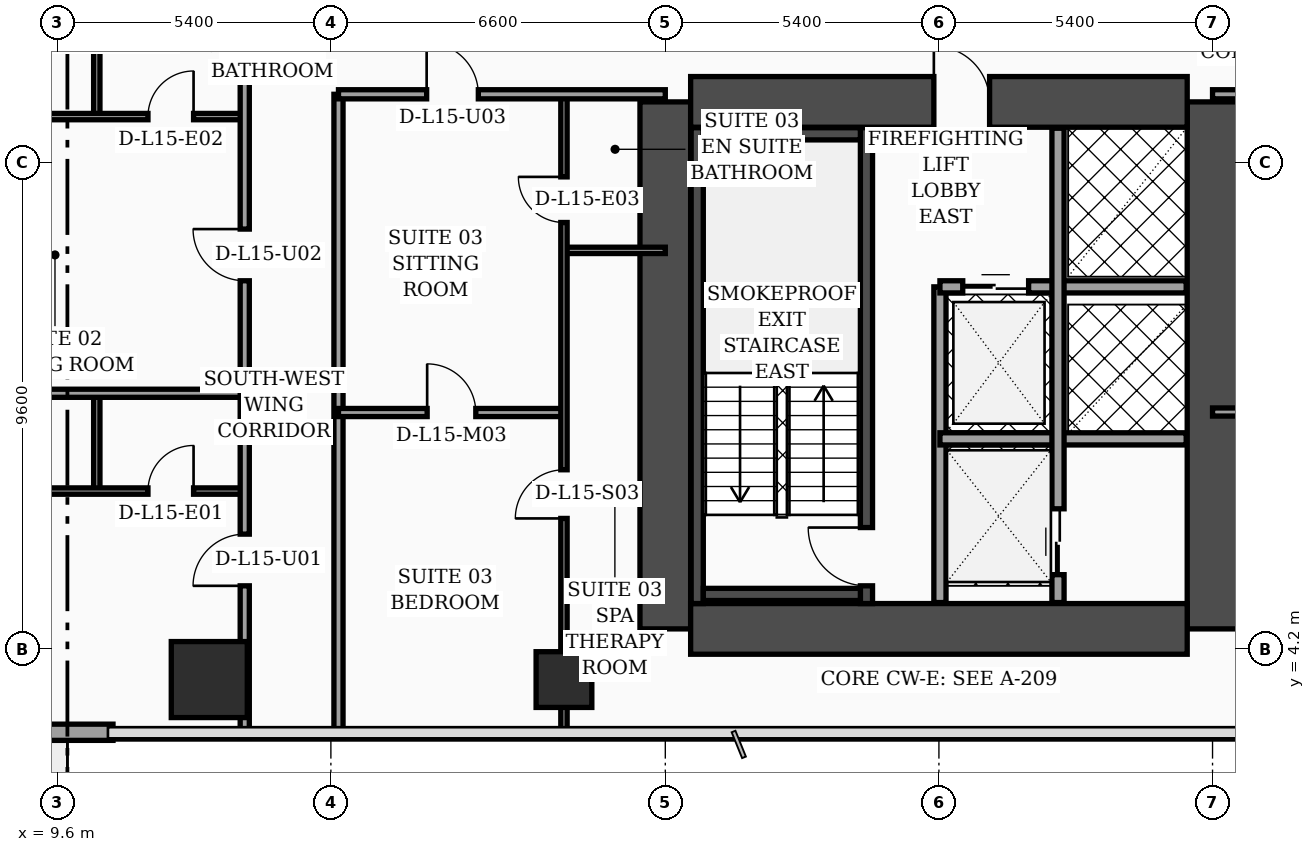
"""IFC4 building model, lengths in metres.
Left out: names, types, materials, properties, quantities, classifications, styles, units other than length and angle.
Written with IfcOpenShell. Run it as: python <this file> out.ifc"""

import sys

from ifc_helpers import new_model, si_unit, direction, frame, frame_2d, origin, origin_2d, place, context, subcontext, project, spatial, rectangle, hollow_rectangle, extrude, element, fill, save


model = new_model("IFC4")
c1 = context("Model", 3, precision=1e-05, world=origin(), true_north=direction((0.0, 1.0)))
c2 = subcontext(c1, "Body", "Model", "MODEL_VIEW")
j1 = project(units=[si_unit("LENGTHUNIT", "METRE"), si_unit("PLANEANGLEUNIT", "RADIAN")], contexts=[c1])
p1 = place(None, origin())
s1 = spatial("IfcSite", under=j1, at=p1, CompositionType="ELEMENT")
p2 = place(p1, origin())
s2 = spatial("IfcBuilding", under=s1, at=p2, CompositionType="ELEMENT")
p3 = place(p2, frame((0.0, 0.0, 66.0)))
s3 = spatial("IfcBuildingStorey", under=s2, at=p3, CompositionType="ELEMENT", Elevation=66.0)
for number, where, z_axis, x_axis in (
    (1, (21.6, 4.6, 0.0), (0.0, 0.0, 1.0), (0.0, 1.0, 0.0)),
    (2, (32.4, 4.6, 0.0), (0.0, 0.0, 1.0), (0.0, 1.0, 0.0)),
):
    element("IfcWall", number, at=place(p3, frame(where, z_axis=z_axis, x_axis=x_axis)), inside=s3, PredefinedType="SHEAR", context=c2, shape_type="SweptSolid", body=[
        extrude(rectangle(XDim=10.4, YDim=1.0, at=frame_2d((5.2, 0.0))), origin(), (0.0, 0.0, 1.0), 3.56),
    ])
p4 = place(p3, frame((22.1, 15.0, 0.0), z_axis=(0.0, 0.0, 1.0), x_axis=(1.0, 0.0, 0.0)))
e3 = element("IfcWall", 3, at=p4, inside=s3, PredefinedType="SHEAR", context=c2, shape_type="SweptSolid", body=[
    extrude(rectangle(XDim=9.8, YDim=1.0, at=frame_2d((4.9, 0.0))), origin(), (0.0, 0.0, 1.0), 3.56),
])
p5 = place(p4, frame((4.8, 0.0, 0.0)))
e4 = element("IfcOpeningElement", 4, at=p5, cuts=e3, PredefinedType="OPENING", context=c2, shape_type="SweptSolid", body=[
    extrude(rectangle(XDim=1.1, YDim=2.2, at=frame_2d((0.55, 1.1))), frame((0.0, 0.51, 0.0), z_axis=(0.0, -1.0, 0.0), x_axis=(1.0, 0.0, 0.0)), (0.0, 0.0, 1.0), 1.02),
])
p6 = place(p3, frame((22.1, 4.6, 0.0), z_axis=(0.0, 0.0, 1.0), x_axis=(1.0, 0.0, 0.0)))
e5 = element("IfcWall", 5, at=p6, inside=s3, PredefinedType="SHEAR", context=c2, shape_type="SweptSolid", body=[
    extrude(rectangle(XDim=9.8, YDim=1.0, at=frame_2d((4.9, 0.0))), origin(), (0.0, 0.0, 1.0), 3.56),
])
p7 = place(p3, frame((22.23, 5.1, 0.0), z_axis=(0.0, 0.0, 1.0), x_axis=(0.0, 1.0, 0.0)))
e6 = element("IfcWall", 6, at=p7, inside=s3, PredefinedType="SOLIDWALL", context=c2, shape_type="SweptSolid", body=[
    extrude(rectangle(XDim=9.39, YDim=0.24, at=frame_2d((4.695, 0.0))), origin(), (0.0, 0.0, 1.0), 3.56),
])
p8 = place(p3, frame((25.57, 5.1, 0.0), z_axis=(0.0, 0.0, 1.0), x_axis=(0.0, 1.0, 0.0)))
e7 = element("IfcWall", 7, at=p8, inside=s3, PredefinedType="SOLIDWALL", context=c2, shape_type="SweptSolid", body=[
    extrude(rectangle(XDim=9.39, YDim=0.24, at=frame_2d((4.695, 0.0))), origin(), (0.0, 0.0, 1.0), 3.56),
])
p9 = place(p8, frame((0.35, 0.0, 0.0)))
e8 = element("IfcOpeningElement", 8, at=p9, cuts=e7, PredefinedType="OPENING", context=c2, shape_type="SweptSolid", body=[
    extrude(rectangle(XDim=1.15, YDim=2.2, at=frame_2d((0.575, 1.1))), frame((0.0, 0.13, 0.0), z_axis=(0.0, -1.0, 0.0), x_axis=(1.0, 0.0, 0.0)), (0.0, 0.0, 1.0), 0.26),
])
for number, where, z_axis, x_axis in (
    (9, (22.35, 5.28, 0.0), (0.0, 0.0, 1.0), (1.0, 0.0, 0.0)),
    (10, (22.35, 14.37, 0.0), (0.0, 0.0, 1.0), (1.0, 0.0, 0.0)),
):
    element("IfcWall", number, at=place(p3, frame(where, z_axis=z_axis, x_axis=x_axis)), inside=s3, PredefinedType="SOLIDWALL", context=c2, shape_type="SweptSolid", body=[
        extrude(rectangle(XDim=3.1, YDim=0.24, at=frame_2d((1.55, 0.0))), origin(), (0.0, 0.0, 1.0), 3.56),
    ])
p10 = place(p3, frame((12.6, 3.6, 0.0), z_axis=(0.0, 0.0, 1.0), x_axis=(1.0, 0.0, 0.0)))
e11 = element("IfcColumn", 11, at=p10, inside=s3, PredefinedType="COLUMN", context=c2, shape_type="SweptSolid", body=[
    extrude(rectangle(XDim=1.5, YDim=1.5, at=origin_2d()), origin(), (0.0, 0.0, 1.0), 3.56),
])
p11 = place(p3, frame((19.6, 3.6, 0.0), z_axis=(0.0, 0.0, 1.0), x_axis=(1.0, 0.0, 0.0)))
e12 = element("IfcColumn", 12, at=p11, inside=s3, PredefinedType="COLUMN", context=c2, shape_type="SweptSolid", body=[
    extrude(hollow_rectangle(XDim=1.1, YDim=1.1, WallThickness=0.045, at=origin_2d()), origin(), (0.0, 0.0, 1.0), 3.56),
])
p12 = place(p3, frame((3.1, 2.56, 0.0), z_axis=(0.0, 0.0, 1.0), x_axis=(1.0, 0.0, 0.0)))
e13 = element("IfcWall", 13, at=p12, inside=s3, PredefinedType="SOLIDWALL", context=c2, shape_type="SweptSolid", body=[
    extrude(rectangle(XDim=7.6, YDim=0.32, at=frame_2d((3.8, 0.0))), origin(), (0.0, 0.0, 1.0), 3.56),
])
p13 = place(p12, frame((0.45, 0.0, 0.75)))
e14 = element("IfcOpeningElement", 14, at=p13, cuts=e13, PredefinedType="OPENING", context=c2, shape_type="SweptSolid", body=[
    extrude(rectangle(XDim=1.0, YDim=1.6, at=frame_2d((0.5, 0.8))), frame((0.0, 0.17, 0.0), z_axis=(0.0, -1.0, 0.0), x_axis=(1.0, 0.0, 0.0)), (0.0, 0.0, 1.0), 0.34),
])
p14 = place(p12, frame((3.8, 0.0, 0.0)))
e15 = element("IfcOpeningElement", 15, at=p14, cuts=e13, PredefinedType="OPENING", context=c2, shape_type="SweptSolid", body=[
    extrude(rectangle(XDim=1.4, YDim=2.25, at=frame_2d((0.7, 1.125))), frame((0.0, 0.17, 0.0), z_axis=(0.0, -1.0, 0.0), x_axis=(1.0, 0.0, 0.0)), (0.0, 0.0, 1.0), 0.34),
])
p15 = place(p3, frame((27.02, 5.12, 0.0), z_axis=(0.0, 0.0, 1.0), x_axis=(0.0, 1.0, 0.0)))
e16 = element("IfcWall", 16, at=p15, inside=s3, PredefinedType="SOLIDWALL", context=c2, shape_type="SweptSolid", body=[
    extrude(rectangle(XDim=6.23, YDim=0.24, at=frame_2d((3.115, 0.0))), origin(), (0.0, 0.0, 1.0), 3.56),
])
p16 = place(p3, frame((27.02, 11.35, 0.0), z_axis=(0.0, 0.0, 1.0), x_axis=(1.0, 0.0, 0.0)))
e17 = element("IfcWall", 17, at=p16, inside=s3, PredefinedType="SOLIDWALL", context=c2, shape_type="SweptSolid", body=[
    extrude(rectangle(XDim=4.86, YDim=0.24, at=frame_2d((2.43, 0.0))), origin(), (0.0, 0.0, 1.0), 3.56),
])
p17 = place(p16, frame((0.45, 0.0, 0.0)))
e18 = element("IfcOpeningElement", 18, at=p17, cuts=e17, PredefinedType="OPENING", context=c2, shape_type="SweptSolid", body=[
    extrude(rectangle(XDim=1.3, YDim=2.35, at=frame_2d((0.65, 1.175))), frame((0.0, 0.13, 0.0), z_axis=(0.0, -1.0, 0.0), x_axis=(1.0, 0.0, 0.0)), (0.0, 0.0, 1.0), 0.26),
])
p18 = place(p3, frame((27.02, 8.35, 0.0), z_axis=(0.0, 0.0, 1.0), x_axis=(1.0, 0.0, 0.0)))
e19 = element("IfcWall", 19, at=p18, inside=s3, PredefinedType="SOLIDWALL", context=c2, shape_type="SweptSolid", body=[
    extrude(rectangle(XDim=4.86, YDim=0.24, at=frame_2d((2.43, 0.0))), origin(), (0.0, 0.0, 1.0), 3.56),
])
p19 = place(p3, frame((29.35, 5.12, 0.0), z_axis=(0.0, 0.0, 1.0), x_axis=(0.0, 1.0, 0.0)))
e20 = element("IfcWall", 20, at=p19, inside=s3, PredefinedType="SOLIDWALL", context=c2, shape_type="SweptSolid", body=[
    extrude(rectangle(XDim=9.36, YDim=0.24, at=frame_2d((4.68, 0.0))), origin(), (0.0, 0.0, 1.0), 3.56),
])
p20 = place(p19, frame((0.55, 0.0, 0.0)))
e21 = element("IfcOpeningElement", 21, at=p20, cuts=e20, PredefinedType="OPENING", context=c2, shape_type="SweptSolid", body=[
    extrude(rectangle(XDim=1.3, YDim=2.35, at=frame_2d((0.65, 1.175))), frame((0.0, 0.13, 0.0), z_axis=(0.0, -1.0, 0.0), x_axis=(1.0, 0.0, 0.0)), (0.0, 0.0, 1.0), 0.26),
])
p21 = place(p3, frame((10.38, 7.32, 0.0), z_axis=(0.0, 0.0, 1.0), x_axis=(0.0, 1.0, 0.0)))
e22 = element("IfcWall", 22, at=p21, inside=s3, PredefinedType="PARTITIONING", context=c2, shape_type="SweptSolid", body=[
    extrude(rectangle(XDim=1.93, YDim=0.125, at=frame_2d((0.965, 0.0))), origin(), (0.0, 0.0, 1.0), 3.56),
])
p22 = place(p3, frame((3.2, 7.32, 0.0), z_axis=(0.0, 0.0, 1.0), x_axis=(1.0, 0.0, 0.0)))
e23 = element("IfcWall", 23, at=p22, inside=s3, PredefinedType="PARTITIONING", context=c2, shape_type="SweptSolid", body=[
    extrude(rectangle(XDim=10.1, YDim=0.125, at=frame_2d((5.05, 0.0))), origin(), (0.0, 0.0, 1.0), 2.84),
])
p23 = place(p22, frame((3.29, 0.0, 0.0)))
e24 = element("IfcOpeningElement", 24, at=p23, cuts=e23, PredefinedType="OPENING", context=c2, shape_type="SweptSolid", body=[
    extrude(rectangle(XDim=0.96, YDim=2.2, at=frame_2d((0.48, 1.1))), frame((0.0, 0.073, 0.0), z_axis=(0.0, -1.0, 0.0), x_axis=(1.0, 0.0, 0.0)), (0.0, 0.0, 1.0), 0.145),
])
p24 = place(p22, frame((8.19, 0.0, 0.0)))
e25 = element("IfcOpeningElement", 25, at=p24, cuts=e23, PredefinedType="OPENING", context=c2, shape_type="SweptSolid", body=[
    extrude(rectangle(XDim=0.9, YDim=2.15, at=frame_2d((0.45, 1.075))), frame((0.0, 0.073, 0.0), z_axis=(0.0, -1.0, 0.0), x_axis=(1.0, 0.0, 0.0)), (0.0, 0.0, 1.0), 0.145),
])
p25 = place(p3, frame((10.38, 14.71, 0.0), z_axis=(0.0, 0.0, 1.0), x_axis=(0.0, 1.0, 0.0)))
e26 = element("IfcWall", 26, at=p25, inside=s3, PredefinedType="PARTITIONING", context=c2, shape_type="SweptSolid", body=[
    extrude(rectangle(XDim=2.09, YDim=0.125, at=frame_2d((1.045, 0.0))), origin(), (0.0, 0.0, 1.0), 3.56),
])
p26 = place(p3, frame((0.08, 14.71, 0.0), z_axis=(0.0, 0.0, 1.0), x_axis=(1.0, 0.0, 0.0)))
e27 = element("IfcWall", 27, at=p26, inside=s3, PredefinedType="PARTITIONING", context=c2, shape_type="SweptSolid", body=[
    extrude(rectangle(XDim=13.22, YDim=0.125, at=frame_2d((6.61, 0.0))), origin(), (0.0, 0.0, 1.0), 2.84),
])
p27 = place(p26, frame((4.67, 0.0, 0.0)))
e28 = element("IfcOpeningElement", 28, at=p27, cuts=e27, PredefinedType="OPENING", context=c2, shape_type="SweptSolid", body=[
    extrude(rectangle(XDim=0.96, YDim=2.2, at=frame_2d((0.48, 1.1))), frame((0.0, 0.073, 0.0), z_axis=(0.0, -1.0, 0.0), x_axis=(1.0, 0.0, 0.0)), (0.0, 0.0, 1.0), 0.145),
])
p28 = place(p26, frame((11.31, 0.0, 0.0)))
e29 = element("IfcOpeningElement", 29, at=p28, cuts=e27, PredefinedType="OPENING", context=c2, shape_type="SweptSolid", body=[
    extrude(rectangle(XDim=0.9, YDim=2.15, at=frame_2d((0.45, 1.075))), frame((0.0, 0.073, 0.0), z_axis=(0.0, -1.0, 0.0), x_axis=(1.0, 0.0, 0.0)), (0.0, 0.0, 1.0), 0.145),
])
p29 = place(p3, frame((0.08, 9.25, 0.0), z_axis=(0.0, 0.0, 1.0), x_axis=(1.0, 0.0, 0.0)))
e30 = element("IfcWall", 30, at=p29, inside=s3, PredefinedType="PARTITIONING", context=c2, shape_type="SweptSolid", body=[
    extrude(rectangle(XDim=13.22, YDim=0.16, at=frame_2d((6.61, 0.0))), origin(), (0.0, 0.0, 1.0), 2.84),
])
p30 = place(p3, frame((13.3, 2.44, 0.0), z_axis=(0.0, 0.0, 1.0), x_axis=(0.0, 1.0, 0.0)))
e31 = element("IfcWall", 31, at=p30, inside=s3, PredefinedType="PARTITIONING", context=c2, shape_type="SweptSolid", body=[
    extrude(rectangle(XDim=14.36, YDim=0.18, at=frame_2d((7.18, 0.0))), origin(), (0.0, 0.0, 1.0), 3.04),
])
p31 = place(p30, frame((3.01, 0.0, 0.0)))
e32 = element("IfcOpeningElement", 32, at=p31, cuts=e31, PredefinedType="OPENING", context=c2, shape_type="SweptSolid", body=[
    extrude(rectangle(XDim=1.02, YDim=2.2, at=frame_2d((0.51, 1.1))), frame((0.0, 0.1, 0.0), z_axis=(0.0, -1.0, 0.0), x_axis=(1.0, 0.0, 0.0)), (0.0, 0.0, 1.0), 0.2),
])
p32 = place(p30, frame((9.03, 0.0, 0.0)))
e33 = element("IfcOpeningElement", 33, at=p32, cuts=e31, PredefinedType="OPENING", context=c2, shape_type="SweptSolid", body=[
    extrude(rectangle(XDim=1.02, YDim=2.2, at=frame_2d((0.51, 1.1))), frame((0.0, 0.1, 0.0), z_axis=(0.0, -1.0, 0.0), x_axis=(1.0, 0.0, 0.0)), (0.0, 0.0, 1.0), 0.2),
])
p33 = place(p3, frame((15.15, 2.44, 0.0), z_axis=(0.0, 0.0, 1.0), x_axis=(0.0, 1.0, 0.0)))
e34 = element("IfcWall", 34, at=p33, inside=s3, PredefinedType="PARTITIONING", context=c2, shape_type="SweptSolid", body=[
    extrude(rectangle(XDim=12.71, YDim=0.18, at=frame_2d((6.355, 0.0))), origin(), (0.0, 0.0, 1.0), 3.04),
])
p34 = place(p3, frame((19.6, 12.07, 0.0), z_axis=(0.0, 0.0, 1.0), x_axis=(1.0, 0.0, 0.0)))
e35 = element("IfcWall", 35, at=p34, inside=s3, PredefinedType="PARTITIONING", context=c2, shape_type="SweptSolid", body=[
    extrude(rectangle(XDim=2.0, YDim=0.125, at=frame_2d((1.0, 0.0))), origin(), (0.0, 0.0, 1.0), 3.56),
])
p35 = place(p3, frame((15.15, 8.87, 0.0), z_axis=(0.0, 0.0, 1.0), x_axis=(1.0, 0.0, 0.0)))
e36 = element("IfcWall", 36, at=p35, inside=s3, PredefinedType="PARTITIONING", context=c2, shape_type="SweptSolid", body=[
    extrude(rectangle(XDim=4.45, YDim=0.16, at=frame_2d((2.225, 0.0))), origin(), (0.0, 0.0, 1.0), 3.56),
])
p36 = place(p35, frame((1.75, 0.0, 0.0)))
e37 = element("IfcOpeningElement", 37, at=p36, cuts=e36, PredefinedType="OPENING", context=c2, shape_type="SweptSolid", body=[
    extrude(rectangle(XDim=0.96, YDim=2.2, at=frame_2d((0.48, 1.1))), frame((0.0, 0.09, 0.0), z_axis=(0.0, -1.0, 0.0), x_axis=(1.0, 0.0, 0.0)), (0.0, 0.0, 1.0), 0.18),
])
p37 = place(p3, frame((19.6, 2.44, 0.0), z_axis=(0.0, 0.0, 1.0), x_axis=(0.0, 1.0, 0.0)))
e38 = element("IfcWall", 38, at=p37, inside=s3, PredefinedType="PARTITIONING", context=c2, shape_type="SweptSolid", body=[
    extrude(rectangle(XDim=12.71, YDim=0.125, at=frame_2d((6.355, 0.0))), origin(), (0.0, 0.0, 1.0), 2.34),
])
p38 = place(p37, frame((4.34, 0.0, 0.0)))
e39 = element("IfcOpeningElement", 39, at=p38, cuts=e38, PredefinedType="OPENING", context=c2, shape_type="SweptSolid", body=[
    extrude(rectangle(XDim=0.96, YDim=2.2, at=frame_2d((0.48, 1.1))), frame((0.0, 0.073, 0.0), z_axis=(0.0, -1.0, 0.0), x_axis=(1.0, 0.0, 0.0)), (0.0, 0.0, 1.0), 0.145),
])
p39 = place(p37, frame((10.18, 0.0, 0.0)))
e40 = element("IfcOpeningElement", 40, at=p39, cuts=e38, PredefinedType="OPENING", context=c2, shape_type="SweptSolid", body=[
    extrude(rectangle(XDim=0.9, YDim=2.15, at=frame_2d((0.45, 1.075))), frame((0.0, 0.073, 0.0), z_axis=(0.0, -1.0, 0.0), x_axis=(1.0, 0.0, 0.0)), (0.0, 0.0, 1.0), 0.145),
])
p40 = place(p3, frame((15.15, 15.15, 0.0), z_axis=(0.0, 0.0, 1.0), x_axis=(1.0, 0.0, 0.0)))
e41 = element("IfcWall", 41, at=p40, inside=s3, PredefinedType="PARTITIONING", context=c2, shape_type="SweptSolid", body=[
    extrude(rectangle(XDim=6.45, YDim=0.18, at=frame_2d((3.225, 0.0))), origin(), (0.0, 0.0, 1.0), 2.34),
])
p41 = place(p40, frame((1.74, 0.0, 0.0)))
e42 = element("IfcOpeningElement", 42, at=p41, cuts=e41, PredefinedType="OPENING", context=c2, shape_type="SweptSolid", body=[
    extrude(rectangle(XDim=1.02, YDim=2.2, at=frame_2d((0.51, 1.1))), frame((0.0, 0.1, 0.0), z_axis=(0.0, -1.0, 0.0), x_axis=(1.0, 0.0, 0.0)), (0.0, 0.0, 1.0), 0.2),
])
p42 = place(p3, frame((32.4, 8.88, 0.0), z_axis=(0.0, 0.0, 1.0), x_axis=(1.0, 0.0, 0.0)))
e43 = element("IfcWall", 43, at=p42, inside=s3, PredefinedType="PARTITIONING", context=c2, shape_type="SweptSolid", body=[
    extrude(rectangle(XDim=7.92, YDim=0.16, at=frame_2d((3.96, 0.0))), origin(), (0.0, 0.0, 1.0), 2.84),
])
p43 = place(p42, frame((3.48, 0.0, 0.0)))
e44 = element("IfcOpeningElement", 44, at=p43, cuts=e43, PredefinedType="OPENING", context=c2, shape_type="SweptSolid", body=[
    extrude(rectangle(XDim=0.96, YDim=2.2, at=frame_2d((0.48, 1.1))), frame((0.0, 0.09, 0.0), z_axis=(0.0, -1.0, 0.0), x_axis=(1.0, 0.0, 0.0)), (0.0, 0.0, 1.0), 0.18),
])
p44 = place(p3, frame((32.4, 15.15, 0.0), z_axis=(0.0, 0.0, 1.0), x_axis=(1.0, 0.0, 0.0)))
e45 = element("IfcWall", 45, at=p44, inside=s3, PredefinedType="PARTITIONING", context=c2, shape_type="SweptSolid", body=[
    extrude(rectangle(XDim=18.9, YDim=0.18, at=frame_2d((9.45, 0.0))), origin(), (0.0, 0.0, 1.0), 2.84),
])
p45 = place(p44, frame((3.55, 0.0, 0.0)))
e46 = element("IfcOpeningElement", 46, at=p45, cuts=e45, PredefinedType="OPENING", context=c2, shape_type="SweptSolid", body=[
    extrude(rectangle(XDim=1.02, YDim=2.2, at=frame_2d((0.51, 1.1))), frame((0.0, 0.1, 0.0), z_axis=(0.0, -1.0, 0.0), x_axis=(1.0, 0.0, 0.0)), (0.0, 0.0, 1.0), 0.2),
])
p46 = place(p44, frame((12.9, 0.0, 0.0)))
e47 = element("IfcOpeningElement", 47, at=p46, cuts=e45, PredefinedType="OPENING", context=c2, shape_type="SweptSolid", body=[
    extrude(rectangle(XDim=1.02, YDim=2.2, at=frame_2d((0.51, 1.1))), frame((0.0, 0.1, 0.0), z_axis=(0.0, -1.0, 0.0), x_axis=(1.0, 0.0, 0.0)), (0.0, 0.0, 1.0), 0.2),
])
p47 = place(p17, origin())
e48 = element("IfcDoor", 48, at=p47, inside=s3, OperationType="DOUBLE_DOOR_SLIDING", PredefinedType="DOOR", context=c2, shape_type="SweptSolid", body=[
    extrude(rectangle(XDim=1.3, YDim=2.35, at=frame_2d((0.65, 1.175))), frame((0.0, 0.025, 0.0), z_axis=(0.0, -1.0, 0.0), x_axis=(1.0, 0.0, 0.0)), (0.0, 0.0, 1.0), 0.05),
])
fill(e18, e48)
p48 = place(p20, origin())
e49 = element("IfcDoor", 49, at=p48, inside=s3, OperationType="DOUBLE_DOOR_SLIDING", PredefinedType="DOOR", context=c2, shape_type="SweptSolid", body=[
    extrude(rectangle(XDim=1.3, YDim=2.35, at=frame_2d((0.65, 1.175))), frame((0.0, 0.025, 0.0), z_axis=(0.0, -1.0, 0.0), x_axis=(1.0, 0.0, 0.0)), (0.0, 0.0, 1.0), 0.05),
])
fill(e21, e49)
p49 = place(p24, origin())
e50 = element("IfcDoor", 50, at=p49, inside=s3, OperationType="SINGLE_SWING_RIGHT", PredefinedType="DOOR", context=c2, shape_type="SweptSolid", body=[
    extrude(rectangle(XDim=0.9, YDim=2.15, at=frame_2d((0.45, 1.075))), frame((0.0, 0.025, 0.0), z_axis=(0.0, -1.0, 0.0), x_axis=(1.0, 0.0, 0.0)), (0.0, 0.0, 1.0), 0.05),
])
fill(e25, e50)
p50 = place(p28, origin())
e51 = element("IfcDoor", 51, at=p50, inside=s3, OperationType="SINGLE_SWING_RIGHT", PredefinedType="DOOR", context=c2, shape_type="SweptSolid", body=[
    extrude(rectangle(XDim=0.9, YDim=2.15, at=frame_2d((0.45, 1.075))), frame((0.0, 0.025, 0.0), z_axis=(0.0, -1.0, 0.0), x_axis=(1.0, 0.0, 0.0)), (0.0, 0.0, 1.0), 0.05),
])
fill(e29, e51)
p51 = place(p31, origin())
e52 = element("IfcDoor", 52, at=p51, inside=s3, OperationType="SINGLE_SWING_LEFT", PredefinedType="DOOR", context=c2, shape_type="SweptSolid", body=[
    extrude(rectangle(XDim=1.02, YDim=2.2, at=frame_2d((0.51, 1.1))), frame((0.0, 0.025, 0.0), z_axis=(0.0, -1.0, 0.0), x_axis=(1.0, 0.0, 0.0)), (0.0, 0.0, 1.0), 0.05),
])
fill(e32, e52)
p52 = place(p32, origin())
e53 = element("IfcDoor", 53, at=p52, inside=s3, OperationType="SINGLE_SWING_RIGHT", PredefinedType="DOOR", context=c2, shape_type="SweptSolid", body=[
    extrude(rectangle(XDim=1.02, YDim=2.2, at=frame_2d((0.51, 1.1))), frame((0.0, 0.025, 0.0), z_axis=(0.0, -1.0, 0.0), x_axis=(1.0, 0.0, 0.0)), (0.0, 0.0, 1.0), 0.05),
])
fill(e33, e53)
p53 = place(p36, origin())
e54 = element("IfcDoor", 54, at=p53, inside=s3, OperationType="SINGLE_SWING_LEFT", PredefinedType="DOOR", context=c2, shape_type="SweptSolid", body=[
    extrude(rectangle(XDim=0.96, YDim=2.2, at=frame_2d((0.48, 1.1))), frame((0.0, 0.025, 0.0), z_axis=(0.0, -1.0, 0.0), x_axis=(1.0, 0.0, 0.0)), (0.0, 0.0, 1.0), 0.05),
])
fill(e37, e54)
p54 = place(p38, origin())
e55 = element("IfcDoor", 55, at=p54, inside=s3, OperationType="SINGLE_SWING_LEFT", PredefinedType="DOOR", context=c2, shape_type="SweptSolid", body=[
    extrude(rectangle(XDim=0.96, YDim=2.2, at=frame_2d((0.48, 1.1))), frame((0.0, 0.025, 0.0), z_axis=(0.0, -1.0, 0.0), x_axis=(1.0, 0.0, 0.0)), (0.0, 0.0, 1.0), 0.05),
])
fill(e39, e55)
p55 = place(p39, origin())
e56 = element("IfcDoor", 56, at=p55, inside=s3, OperationType="SINGLE_SWING_RIGHT", PredefinedType="DOOR", context=c2, shape_type="SweptSolid", body=[
    extrude(rectangle(XDim=0.9, YDim=2.15, at=frame_2d((0.45, 1.075))), frame((0.0, 0.025, 0.0), z_axis=(0.0, -1.0, 0.0), x_axis=(1.0, 0.0, 0.0)), (0.0, 0.0, 1.0), 0.05),
])
fill(e40, e56)
p56 = place(p41, origin())
e57 = element("IfcDoor", 57, at=p56, inside=s3, OperationType="SINGLE_SWING_LEFT", PredefinedType="DOOR", context=c2, shape_type="SweptSolid", body=[
    extrude(rectangle(XDim=1.02, YDim=2.2, at=frame_2d((0.51, 1.1))), frame((0.0, 0.025, 0.0), z_axis=(0.0, -1.0, 0.0), x_axis=(1.0, 0.0, 0.0)), (0.0, 0.0, 1.0), 0.05),
])
fill(e42, e57)
p57 = place(p9, origin())
e58 = element("IfcDoor", 58, at=p57, inside=s3, OperationType="SINGLE_SWING_RIGHT", PredefinedType="DOOR", context=c2, shape_type="SweptSolid", body=[
    extrude(rectangle(XDim=1.15, YDim=2.2, at=frame_2d((0.575, 1.1))), frame((0.0, 0.025, 0.0), z_axis=(0.0, -1.0, 0.0), x_axis=(1.0, 0.0, 0.0)), (0.0, 0.0, 1.0), 0.05),
])
fill(e8, e58)
p58 = place(p5, origin())
e59 = element("IfcDoor", 59, at=p58, inside=s3, OperationType="SINGLE_SWING_LEFT", PredefinedType="DOOR", context=c2, shape_type="SweptSolid", body=[
    extrude(rectangle(XDim=1.1, YDim=2.2, at=frame_2d((0.55, 1.1))), frame((0.0, 0.025, 0.0), z_axis=(0.0, -1.0, 0.0), x_axis=(1.0, 0.0, 0.0)), (0.0, 0.0, 1.0), 0.05),
])
fill(e4, e59)
save(model, sys.argv[1])
